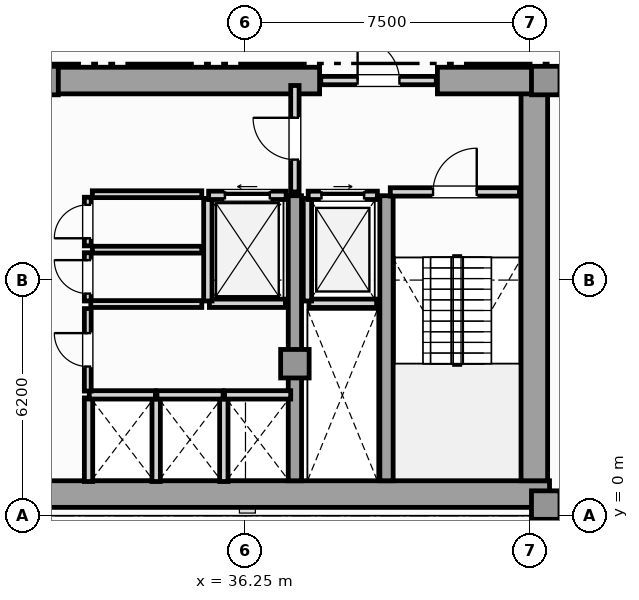
"""IFC4 building model, lengths in metres.
Left out: names, types, materials, properties, quantities, classifications, styles, units other than length and angle.
Written with IfcOpenShell. Run it as: python <this file> out.ifc"""

import sys

from ifc_helpers import new_model, si_unit, direction, frame, frame_2d, origin, origin_2d, place, context, subcontext, project, spatial, rectangle, extrude, element, fill, save


model = new_model("IFC4")
c1 = context("Model", 3, precision=1e-05, world=origin(), true_north=direction((0.0, 1.0)))
c2 = subcontext(c1, "Body", "Model", "MODEL_VIEW")
j1 = project(units=[si_unit("LENGTHUNIT", "METRE"), si_unit("PLANEANGLEUNIT", "RADIAN")], contexts=[c1])
p1 = place(None, origin())
s1 = spatial("IfcSite", under=j1, at=p1, CompositionType="ELEMENT")
p2 = place(p1, origin())
s2 = spatial("IfcBuilding", under=s1, at=p2, CompositionType="ELEMENT")
p3 = place(p2, frame((0.0, 0.0, 72.15)))
s3 = spatial("IfcBuildingStorey", under=s2, at=p3, CompositionType="ELEMENT", Elevation=72.15)
p4 = place(p3, frame((13.25, 0.57, 0.0), z_axis=(0.0, 0.0, 1.0), x_axis=(1.0, 0.0, 0.0)))
e1 = element("IfcWall", 1, at=p4, inside=s3, PredefinedType="SHEAR", context=c2, shape_type="SweptSolid", body=[
    extrude(rectangle(XDim=31.0, YDim=0.7, at=frame_2d((15.5, 0.0))), origin(), (0.0, 0.0, 1.0), 3.57),
])
p5 = place(p3, frame((43.85, 0.92, 0.0), z_axis=(0.0, 0.0, 1.0), x_axis=(0.0, 1.0, 0.0)))
e2 = element("IfcWall", 2, at=p5, inside=s3, PredefinedType="SHEAR", context=c2, shape_type="SweptSolid", body=[
    extrude(rectangle(XDim=10.53, YDim=0.7, at=frame_2d((5.265, 0.0))), origin(), (0.0, 0.0, 1.0), 3.57),
])
p6 = place(p3, frame((30.9, 11.45, 0.0), z_axis=(0.0, 0.0, 1.0), x_axis=(1.0, 0.0, 0.0)))
e3 = element("IfcWall", 3, at=p6, inside=s3, PredefinedType="SHEAR", context=c2, shape_type="SweptSolid", body=[
    extrude(rectangle(XDim=7.3, YDim=0.7, at=frame_2d((3.65, 0.0))), origin(), (0.0, 0.0, 1.0), 3.57),
])
p7 = place(p3, frame((41.3, 11.45, 0.0), z_axis=(0.0, 0.0, 1.0), x_axis=(1.0, 0.0, 0.0)))
e4 = element("IfcWall", 4, at=p7, inside=s3, PredefinedType="SHEAR", context=c2, shape_type="SweptSolid", body=[
    extrude(rectangle(XDim=2.95, YDim=0.7, at=frame_2d((1.475, 0.0))), origin(), (0.0, 0.0, 1.0), 3.57),
])
for number, where, z_axis, x_axis in (
    (5, (37.55, 0.92, 0.0), (0.0, 0.0, 1.0), (0.0, 1.0, 0.0)),
    (6, (39.96, 0.92, 0.0), (0.0, 0.0, 1.0), (0.0, 1.0, 0.0)),
):
    element("IfcWall", number, at=place(p3, frame(where, z_axis=z_axis, x_axis=x_axis)), inside=s3, PredefinedType="SHEAR", context=c2, shape_type="SweptSolid", body=[
        extrude(rectangle(XDim=7.5, YDim=0.35, at=frame_2d((3.75, 0.0))), origin(), (0.0, 0.0, 1.0), 3.57),
    ])
for number, where, z_axis, x_axis in (
    (7, (44.15, 0.28, 0.0), (0.0, 0.0, 1.0), (1.0, 0.0, 0.0)),
    (8, (44.15, 11.45, 0.0), (0.0, 0.0, 1.0), (1.0, 0.0, 0.0)),
    (9, (37.55, 4.0, 0.0), (0.0, 0.0, 1.0), (1.0, 0.0, 0.0)),
    (10, (30.95, 11.45, 0.0), (0.0, 0.0, 1.0), (1.0, 0.0, 0.0)),
):
    element("IfcColumn", number, at=place(p3, frame(where, z_axis=z_axis, x_axis=x_axis)), inside=s3, PredefinedType="COLUMN", context=c2, shape_type="SweptSolid", body=[
        extrude(rectangle(XDim=0.75, YDim=0.75, at=origin_2d()), origin(), (0.0, 0.0, 1.0), 3.85),
    ])
p8 = place(p3, frame((44.25, 0.18, 0.0), z_axis=(0.0, 0.0, 1.0), x_axis=(1.0, 0.0, 0.0)))
e11 = element("IfcWall", 11, at=p8, inside=s3, PredefinedType="SOLIDWALL", context=c2, shape_type="SweptSolid", body=[
    extrude(rectangle(XDim=10.01, YDim=0.35, at=frame_2d((5.005, 0.0))), origin(), (0.0, 0.0, 1.0), 3.57),
])
p9 = place(p8, frame((4.255, 0.0, 0.9)))
e12 = element("IfcOpeningElement", 12, at=p9, cuts=e11, PredefinedType="OPENING", context=c2, shape_type="SweptSolid", body=[
    extrude(rectangle(XDim=1.5, YDim=1.95, at=frame_2d((0.75, 0.975))), frame((0.0, 0.185, 0.0), z_axis=(0.0, -1.0, 0.0), x_axis=(1.0, 0.0, 0.0)), (0.0, 0.0, 1.0), 0.37),
])
p10 = place(p3, frame((37.92, 5.59, 0.0), z_axis=(0.0, 0.0, 1.0), x_axis=(1.0, 0.0, 0.0)))
e13 = element("IfcWall", 13, at=p10, inside=s3, PredefinedType="SOLIDWALL", context=c2, shape_type="SweptSolid", body=[
    extrude(rectangle(XDim=1.78, YDim=0.22, at=frame_2d((0.89, 0.0))), origin(), (0.0, 0.0, 1.0), 3.57),
])
p11 = place(p3, frame((37.88, 5.65, 0.0), z_axis=(0.0, 0.0, 1.0), x_axis=(0.0, 1.0, 0.0)))
e14 = element("IfcWall", 14, at=p11, inside=s3, PredefinedType="SOLIDWALL", context=c2, shape_type="SweptSolid", body=[
    extrude(rectangle(XDim=2.7, YDim=0.22, at=frame_2d((1.35, 0.0))), origin(), (0.0, 0.0, 1.0), 3.57),
])
p12 = place(p3, frame((37.9, 8.43, 0.0), z_axis=(0.0, 0.0, 1.0), x_axis=(1.0, 0.0, 0.0)))
e15 = element("IfcWall", 15, at=p12, inside=s3, PredefinedType="SOLIDWALL", context=c2, shape_type="SweptSolid", body=[
    extrude(rectangle(XDim=1.82, YDim=0.22, at=frame_2d((0.91, 0.0))), origin(), (0.0, 0.0, 1.0), 3.57),
])
p13 = place(p12, frame((0.35, 0.0, 0.0)))
e16 = element("IfcOpeningElement", 16, at=p13, cuts=e15, PredefinedType="OPENING", context=c2, shape_type="SweptSolid", body=[
    extrude(rectangle(XDim=1.12, YDim=2.25, at=frame_2d((0.56, 1.125))), frame((0.0, 0.12, 0.0), z_axis=(0.0, -1.0, 0.0), x_axis=(1.0, 0.0, 0.0)), (0.0, 0.0, 1.0), 0.24),
])
p14 = place(p3, frame((35.3, 5.59, 0.0), z_axis=(0.0, 0.0, 1.0), x_axis=(1.0, 0.0, 0.0)))
e17 = element("IfcWall", 17, at=p14, inside=s3, PredefinedType="SOLIDWALL", context=c2, shape_type="SweptSolid", body=[
    extrude(rectangle(XDim=2.0, YDim=0.22, at=frame_2d((1.0, 0.0))), origin(), (0.0, 0.0, 1.0), 3.57),
])
p15 = place(p3, frame((35.26, 5.65, 0.0), z_axis=(0.0, 0.0, 1.0), x_axis=(0.0, 1.0, 0.0)))
e18 = element("IfcWall", 18, at=p15, inside=s3, PredefinedType="SOLIDWALL", context=c2, shape_type="SweptSolid", body=[
    extrude(rectangle(XDim=2.7, YDim=0.22, at=frame_2d((1.35, 0.0))), origin(), (0.0, 0.0, 1.0), 3.57),
])
p16 = place(p3, frame((35.28, 8.43, 0.0), z_axis=(0.0, 0.0, 1.0), x_axis=(1.0, 0.0, 0.0)))
e19 = element("IfcWall", 19, at=p16, inside=s3, PredefinedType="SOLIDWALL", context=c2, shape_type="SweptSolid", body=[
    extrude(rectangle(XDim=2.04, YDim=0.22, at=frame_2d((1.02, 0.0))), origin(), (0.0, 0.0, 1.0), 3.57),
])
p17 = place(p16, frame((0.43, 0.0, 0.0)))
e20 = element("IfcOpeningElement", 20, at=p17, cuts=e19, PredefinedType="OPENING", context=c2, shape_type="SweptSolid", body=[
    extrude(rectangle(XDim=1.18, YDim=2.2, at=frame_2d((0.59, 1.1))), frame((0.0, 0.12, 0.0), z_axis=(0.0, -1.0, 0.0), x_axis=(1.0, 0.0, 0.0)), (0.0, 0.0, 1.0), 0.24),
])
for number, where, z_axis, x_axis in (
    (21, (32.12, 0.9, 0.0), (0.0, 0.0, 1.0), (0.0, 1.0, 0.0)),
    (22, (33.9, 0.9, 0.0), (0.0, 0.0, 1.0), (0.0, 1.0, 0.0)),
):
    element("IfcWall", number, at=place(p3, frame(where, z_axis=z_axis, x_axis=x_axis)), inside=s3, PredefinedType="SOLIDWALL", context=c2, shape_type="SweptSolid", body=[
        extrude(rectangle(XDim=2.2, YDim=0.22, at=frame_2d((1.1, 0.0))), origin(), (0.0, 0.0, 1.0), 3.57),
    ])
p18 = place(p3, frame((32.14, 3.18, 0.0), z_axis=(0.0, 0.0, 1.0), x_axis=(1.0, 0.0, 0.0)))
e23 = element("IfcWall", 23, at=p18, inside=s3, PredefinedType="SOLIDWALL", context=c2, shape_type="SweptSolid", body=[
    extrude(rectangle(XDim=1.74, YDim=0.22, at=frame_2d((0.87, 0.0))), origin(), (0.0, 0.0, 1.0), 3.57),
])
p19 = place(p3, frame((35.68, 0.9, 0.0), z_axis=(0.0, 0.0, 1.0), x_axis=(0.0, 1.0, 0.0)))
e24 = element("IfcWall", 24, at=p19, inside=s3, PredefinedType="SOLIDWALL", context=c2, shape_type="SweptSolid", body=[
    extrude(rectangle(XDim=2.2, YDim=0.22, at=frame_2d((1.1, 0.0))), origin(), (0.0, 0.0, 1.0), 3.57),
])
for number, where, z_axis, x_axis in (
    (25, (33.92, 3.18, 0.0), (0.0, 0.0, 1.0), (1.0, 0.0, 0.0)),
    (26, (35.7, 3.18, 0.0), (0.0, 0.0, 1.0), (1.0, 0.0, 0.0)),
):
    element("IfcWall", number, at=place(p3, frame(where, z_axis=z_axis, x_axis=x_axis)), inside=s3, PredefinedType="SOLIDWALL", context=c2, shape_type="SweptSolid", body=[
        extrude(rectangle(XDim=1.74, YDim=0.22, at=frame_2d((0.87, 0.0))), origin(), (0.0, 0.0, 1.0), 3.57),
    ])
p20 = place(p3, frame((40.06, 8.52, 0.0), z_axis=(0.0, 0.0, 1.0), x_axis=(1.0, 0.0, 0.0)))
e27 = element("IfcWall", 27, at=p20, inside=s3, PredefinedType="SOLIDWALL", context=c2, shape_type="SweptSolid", body=[
    extrude(rectangle(XDim=3.4, YDim=0.22, at=frame_2d((1.7, 0.0))), origin(), (0.0, 0.0, 1.0), 3.57),
])
p21 = place(p20, frame((1.125, 0.0, 0.0)))
e28 = element("IfcOpeningElement", 28, at=p21, cuts=e27, PredefinedType="OPENING", context=c2, shape_type="SweptSolid", body=[
    extrude(rectangle(XDim=1.15, YDim=2.2, at=frame_2d((0.575, 1.1))), frame((0.0, 0.12, 0.0), z_axis=(0.0, -1.0, 0.0), x_axis=(1.0, 0.0, 0.0)), (0.0, 0.0, 1.0), 0.24),
])
p22 = place(p3, frame((37.55, 8.52, 0.0), z_axis=(0.0, 0.0, 1.0), x_axis=(0.0, 1.0, 0.0)))
e29 = element("IfcWall", 29, at=p22, inside=s3, PredefinedType="SOLIDWALL", context=c2, shape_type="SweptSolid", body=[
    extrude(rectangle(XDim=2.8, YDim=0.22, at=frame_2d((1.4, 0.0))), origin(), (0.0, 0.0, 1.0), 3.026),
])
p23 = place(p22, frame((0.85, 0.0, 0.0)))
e30 = element("IfcOpeningElement", 30, at=p23, cuts=e29, PredefinedType="OPENING", context=c2, shape_type="SweptSolid", body=[
    extrude(rectangle(XDim=1.1, YDim=2.2, at=frame_2d((0.55, 1.1))), frame((0.0, 0.12, 0.0), z_axis=(0.0, -1.0, 0.0), x_axis=(1.0, 0.0, 0.0)), (0.0, 0.0, 1.0), 0.24),
])
p24 = place(p3, frame((38.23, 11.45, 0.0), z_axis=(0.0, 0.0, 1.0), x_axis=(1.0, 0.0, 0.0)))
e31 = element("IfcWall", 31, at=p24, inside=s3, PredefinedType="SOLIDWALL", context=c2, shape_type="SweptSolid", body=[
    extrude(rectangle(XDim=3.04, YDim=0.22, at=frame_2d((1.52, 0.0))), origin(), (0.0, 0.0, 1.0), 3.57),
])
p25 = place(p24, frame((0.97, 0.0, 0.0)))
e32 = element("IfcOpeningElement", 32, at=p25, cuts=e31, PredefinedType="OPENING", context=c2, shape_type="SweptSolid", body=[
    extrude(rectangle(XDim=1.1, YDim=2.2, at=frame_2d((0.55, 1.1))), frame((0.0, 0.12, 0.0), z_axis=(0.0, -1.0, 0.0), x_axis=(1.0, 0.0, 0.0)), (0.0, 0.0, 1.0), 0.24),
])
p26 = place(p3, frame((32.1, 5.65, 0.0), z_axis=(0.0, 0.0, 1.0), x_axis=(0.0, 1.0, 0.0)))
e33 = element("IfcWall", 33, at=p26, inside=s3, PredefinedType="PARTITIONING", context=c2, shape_type="SweptSolid", body=[
    extrude(rectangle(XDim=1.27, YDim=0.18, at=frame_2d((0.635, 0.0))), origin(), (0.0, 0.0, 1.0), 3.57),
])
p27 = place(p26, frame((0.195, 0.0, 0.0)))
e34 = element("IfcOpeningElement", 34, at=p27, cuts=e33, PredefinedType="OPENING", context=c2, shape_type="SweptSolid", body=[
    extrude(rectangle(XDim=0.88, YDim=2.05, at=frame_2d((0.44, 1.025))), frame((0.0, 0.1, 0.0), z_axis=(0.0, -1.0, 0.0), x_axis=(1.0, 0.0, 0.0)), (0.0, 0.0, 1.0), 0.2),
])
p28 = place(p3, frame((32.22, 7.0, 0.0), z_axis=(0.0, 0.0, 1.0), x_axis=(1.0, 0.0, 0.0)))
e35 = element("IfcWall", 35, at=p28, inside=s3, PredefinedType="PARTITIONING", context=c2, shape_type="SweptSolid", body=[
    extrude(rectangle(XDim=2.88, YDim=0.18, at=frame_2d((1.44, 0.0))), origin(), (0.0, 0.0, 1.0), 3.57),
])
p29 = place(p3, frame((32.18, 5.57, 0.0), z_axis=(0.0, 0.0, 1.0), x_axis=(1.0, 0.0, 0.0)))
e36 = element("IfcWall", 36, at=p29, inside=s3, PredefinedType="PARTITIONING", context=c2, shape_type="SweptSolid", body=[
    extrude(rectangle(XDim=2.92, YDim=0.18, at=frame_2d((1.46, 0.0))), origin(), (0.0, 0.0, 1.0), 3.57),
])
p30 = place(p3, frame((32.1, 7.1, 0.0), z_axis=(0.0, 0.0, 1.0), x_axis=(0.0, 1.0, 0.0)))
e37 = element("IfcWall", 37, at=p30, inside=s3, PredefinedType="PARTITIONING", context=c2, shape_type="SweptSolid", body=[
    extrude(rectangle(XDim=1.28, YDim=0.18, at=frame_2d((0.64, 0.0))), origin(), (0.0, 0.0, 1.0), 3.57),
])
p31 = place(p30, frame((0.2, 0.0, 0.0)))
e38 = element("IfcOpeningElement", 38, at=p31, cuts=e37, PredefinedType="OPENING", context=c2, shape_type="SweptSolid", body=[
    extrude(rectangle(XDim=0.88, YDim=2.05, at=frame_2d((0.44, 1.025))), frame((0.0, 0.1, 0.0), z_axis=(0.0, -1.0, 0.0), x_axis=(1.0, 0.0, 0.0)), (0.0, 0.0, 1.0), 0.2),
])
p32 = place(p3, frame((32.22, 8.46, 0.0), z_axis=(0.0, 0.0, 1.0), x_axis=(1.0, 0.0, 0.0)))
e39 = element("IfcWall", 39, at=p32, inside=s3, PredefinedType="PARTITIONING", context=c2, shape_type="SweptSolid", body=[
    extrude(rectangle(XDim=2.88, YDim=0.18, at=frame_2d((1.44, 0.0))), origin(), (0.0, 0.0, 1.0), 3.57),
])
p33 = place(p3, frame((32.1, 3.28, 0.0), z_axis=(0.0, 0.0, 1.0), x_axis=(0.0, 1.0, 0.0)))
e40 = element("IfcWall", 40, at=p33, inside=s3, PredefinedType="PARTITIONING", context=c2, shape_type="SweptSolid", body=[
    extrude(rectangle(XDim=2.17, YDim=0.18, at=frame_2d((1.085, 0.0))), origin(), (0.0, 0.0, 1.0), 3.57),
])
p34 = place(p33, frame((0.645, 0.0, 0.0)))
e41 = element("IfcOpeningElement", 41, at=p34, cuts=e40, PredefinedType="OPENING", context=c2, shape_type="SweptSolid", body=[
    extrude(rectangle(XDim=0.88, YDim=2.05, at=frame_2d((0.44, 1.025))), frame((0.0, 0.1, 0.0), z_axis=(0.0, -1.0, 0.0), x_axis=(1.0, 0.0, 0.0)), (0.0, 0.0, 1.0), 0.2),
])
p35 = place(p3, frame((44.355, 11.6, 0.0), z_axis=(0.0, 0.0, 1.0), x_axis=(1.0, 0.0, 0.0)))
e42 = element("IfcWall", 42, at=p35, inside=s3, PredefinedType="PARTITIONING", context=c2, shape_type="SweptSolid", body=[
    extrude(rectangle(XDim=9.44, YDim=0.18, at=frame_2d((4.72, 0.0))), origin(), (0.0, 0.0, 1.0), 3.57),
])
p36 = place(p35, frame((4.22, 0.0, 0.0)))
e43 = element("IfcOpeningElement", 43, at=p36, cuts=e42, PredefinedType="OPENING", context=c2, shape_type="SweptSolid", body=[
    extrude(rectangle(XDim=1.0, YDim=2.15, at=frame_2d((0.5, 1.075))), frame((0.0, 0.1, 0.0), z_axis=(0.0, -1.0, 0.0), x_axis=(1.0, 0.0, 0.0)), (0.0, 0.0, 1.0), 0.2),
])
p37 = place(p13, origin())
e44 = element("IfcDoor", 44, at=p37, inside=s3, OperationType="SLIDING_TO_RIGHT", PredefinedType="DOOR", context=c2, shape_type="SweptSolid", body=[
    extrude(rectangle(XDim=1.12, YDim=2.25, at=frame_2d((0.56, 1.125))), frame((0.0, 0.025, 0.0), z_axis=(0.0, -1.0, 0.0), x_axis=(1.0, 0.0, 0.0)), (0.0, 0.0, 1.0), 0.05),
])
fill(e16, e44)
p38 = place(p17, origin())
e45 = element("IfcDoor", 45, at=p38, inside=s3, OperationType="SLIDING_TO_LEFT", PredefinedType="DOOR", context=c2, shape_type="SweptSolid", body=[
    extrude(rectangle(XDim=1.18, YDim=2.2, at=frame_2d((0.59, 1.1))), frame((0.0, 0.025, 0.0), z_axis=(0.0, -1.0, 0.0), x_axis=(1.0, 0.0, 0.0)), (0.0, 0.0, 1.0), 0.05),
])
fill(e20, e45)
p39 = place(p21, origin())
e46 = element("IfcDoor", 46, at=p39, inside=s3, OperationType="SINGLE_SWING_RIGHT", PredefinedType="DOOR", context=c2, shape_type="SweptSolid", body=[
    extrude(rectangle(XDim=1.15, YDim=2.2, at=frame_2d((0.575, 1.1))), frame((0.0, 0.025, 0.0), z_axis=(0.0, -1.0, 0.0), x_axis=(1.0, 0.0, 0.0)), (0.0, 0.0, 1.0), 0.05),
])
fill(e28, e46)
p40 = place(p23, origin())
e47 = element("IfcDoor", 47, at=p40, inside=s3, OperationType="SINGLE_SWING_RIGHT", PredefinedType="DOOR", context=c2, shape_type="SweptSolid", body=[
    extrude(rectangle(XDim=1.1, YDim=2.2, at=frame_2d((0.55, 1.1))), frame((0.0, 0.025, 0.0), z_axis=(0.0, -1.0, 0.0), x_axis=(1.0, 0.0, 0.0)), (0.0, 0.0, 1.0), 0.05),
])
fill(e30, e47)
p41 = place(p25, origin())
e48 = element("IfcDoor", 48, at=p41, inside=s3, OperationType="SINGLE_SWING_LEFT", PredefinedType="DOOR", context=c2, shape_type="SweptSolid", body=[
    extrude(rectangle(XDim=1.1, YDim=2.2, at=frame_2d((0.55, 1.1))), frame((0.0, 0.025, 0.0), z_axis=(0.0, -1.0, 0.0), x_axis=(1.0, 0.0, 0.0)), (0.0, 0.0, 1.0), 0.05),
])
fill(e32, e48)
p42 = place(p27, origin())
e49 = element("IfcDoor", 49, at=p42, inside=s3, OperationType="SINGLE_SWING_RIGHT", PredefinedType="DOOR", context=c2, shape_type="SweptSolid", body=[
    extrude(rectangle(XDim=0.88, YDim=2.05, at=frame_2d((0.44, 1.025))), frame((0.0, 0.025, 0.0), z_axis=(0.0, -1.0, 0.0), x_axis=(1.0, 0.0, 0.0)), (0.0, 0.0, 1.0), 0.05),
])
fill(e34, e49)
p43 = place(p31, origin())
e50 = element("IfcDoor", 50, at=p43, inside=s3, OperationType="SINGLE_SWING_LEFT", PredefinedType="DOOR", context=c2, shape_type="SweptSolid", body=[
    extrude(rectangle(XDim=0.88, YDim=2.05, at=frame_2d((0.44, 1.025))), frame((0.0, 0.025, 0.0), z_axis=(0.0, -1.0, 0.0), x_axis=(1.0, 0.0, 0.0)), (0.0, 0.0, 1.0), 0.05),
])
fill(e38, e50)
p44 = place(p34, origin())
e51 = element("IfcDoor", 51, at=p44, inside=s3, OperationType="SINGLE_SWING_RIGHT", PredefinedType="DOOR", context=c2, shape_type="SweptSolid", body=[
    extrude(rectangle(XDim=0.88, YDim=2.05, at=frame_2d((0.44, 1.025))), frame((0.0, 0.025, 0.0), z_axis=(0.0, -1.0, 0.0), x_axis=(1.0, 0.0, 0.0)), (0.0, 0.0, 1.0), 0.05),
])
fill(e41, e51)
save(model, sys.argv[1])
